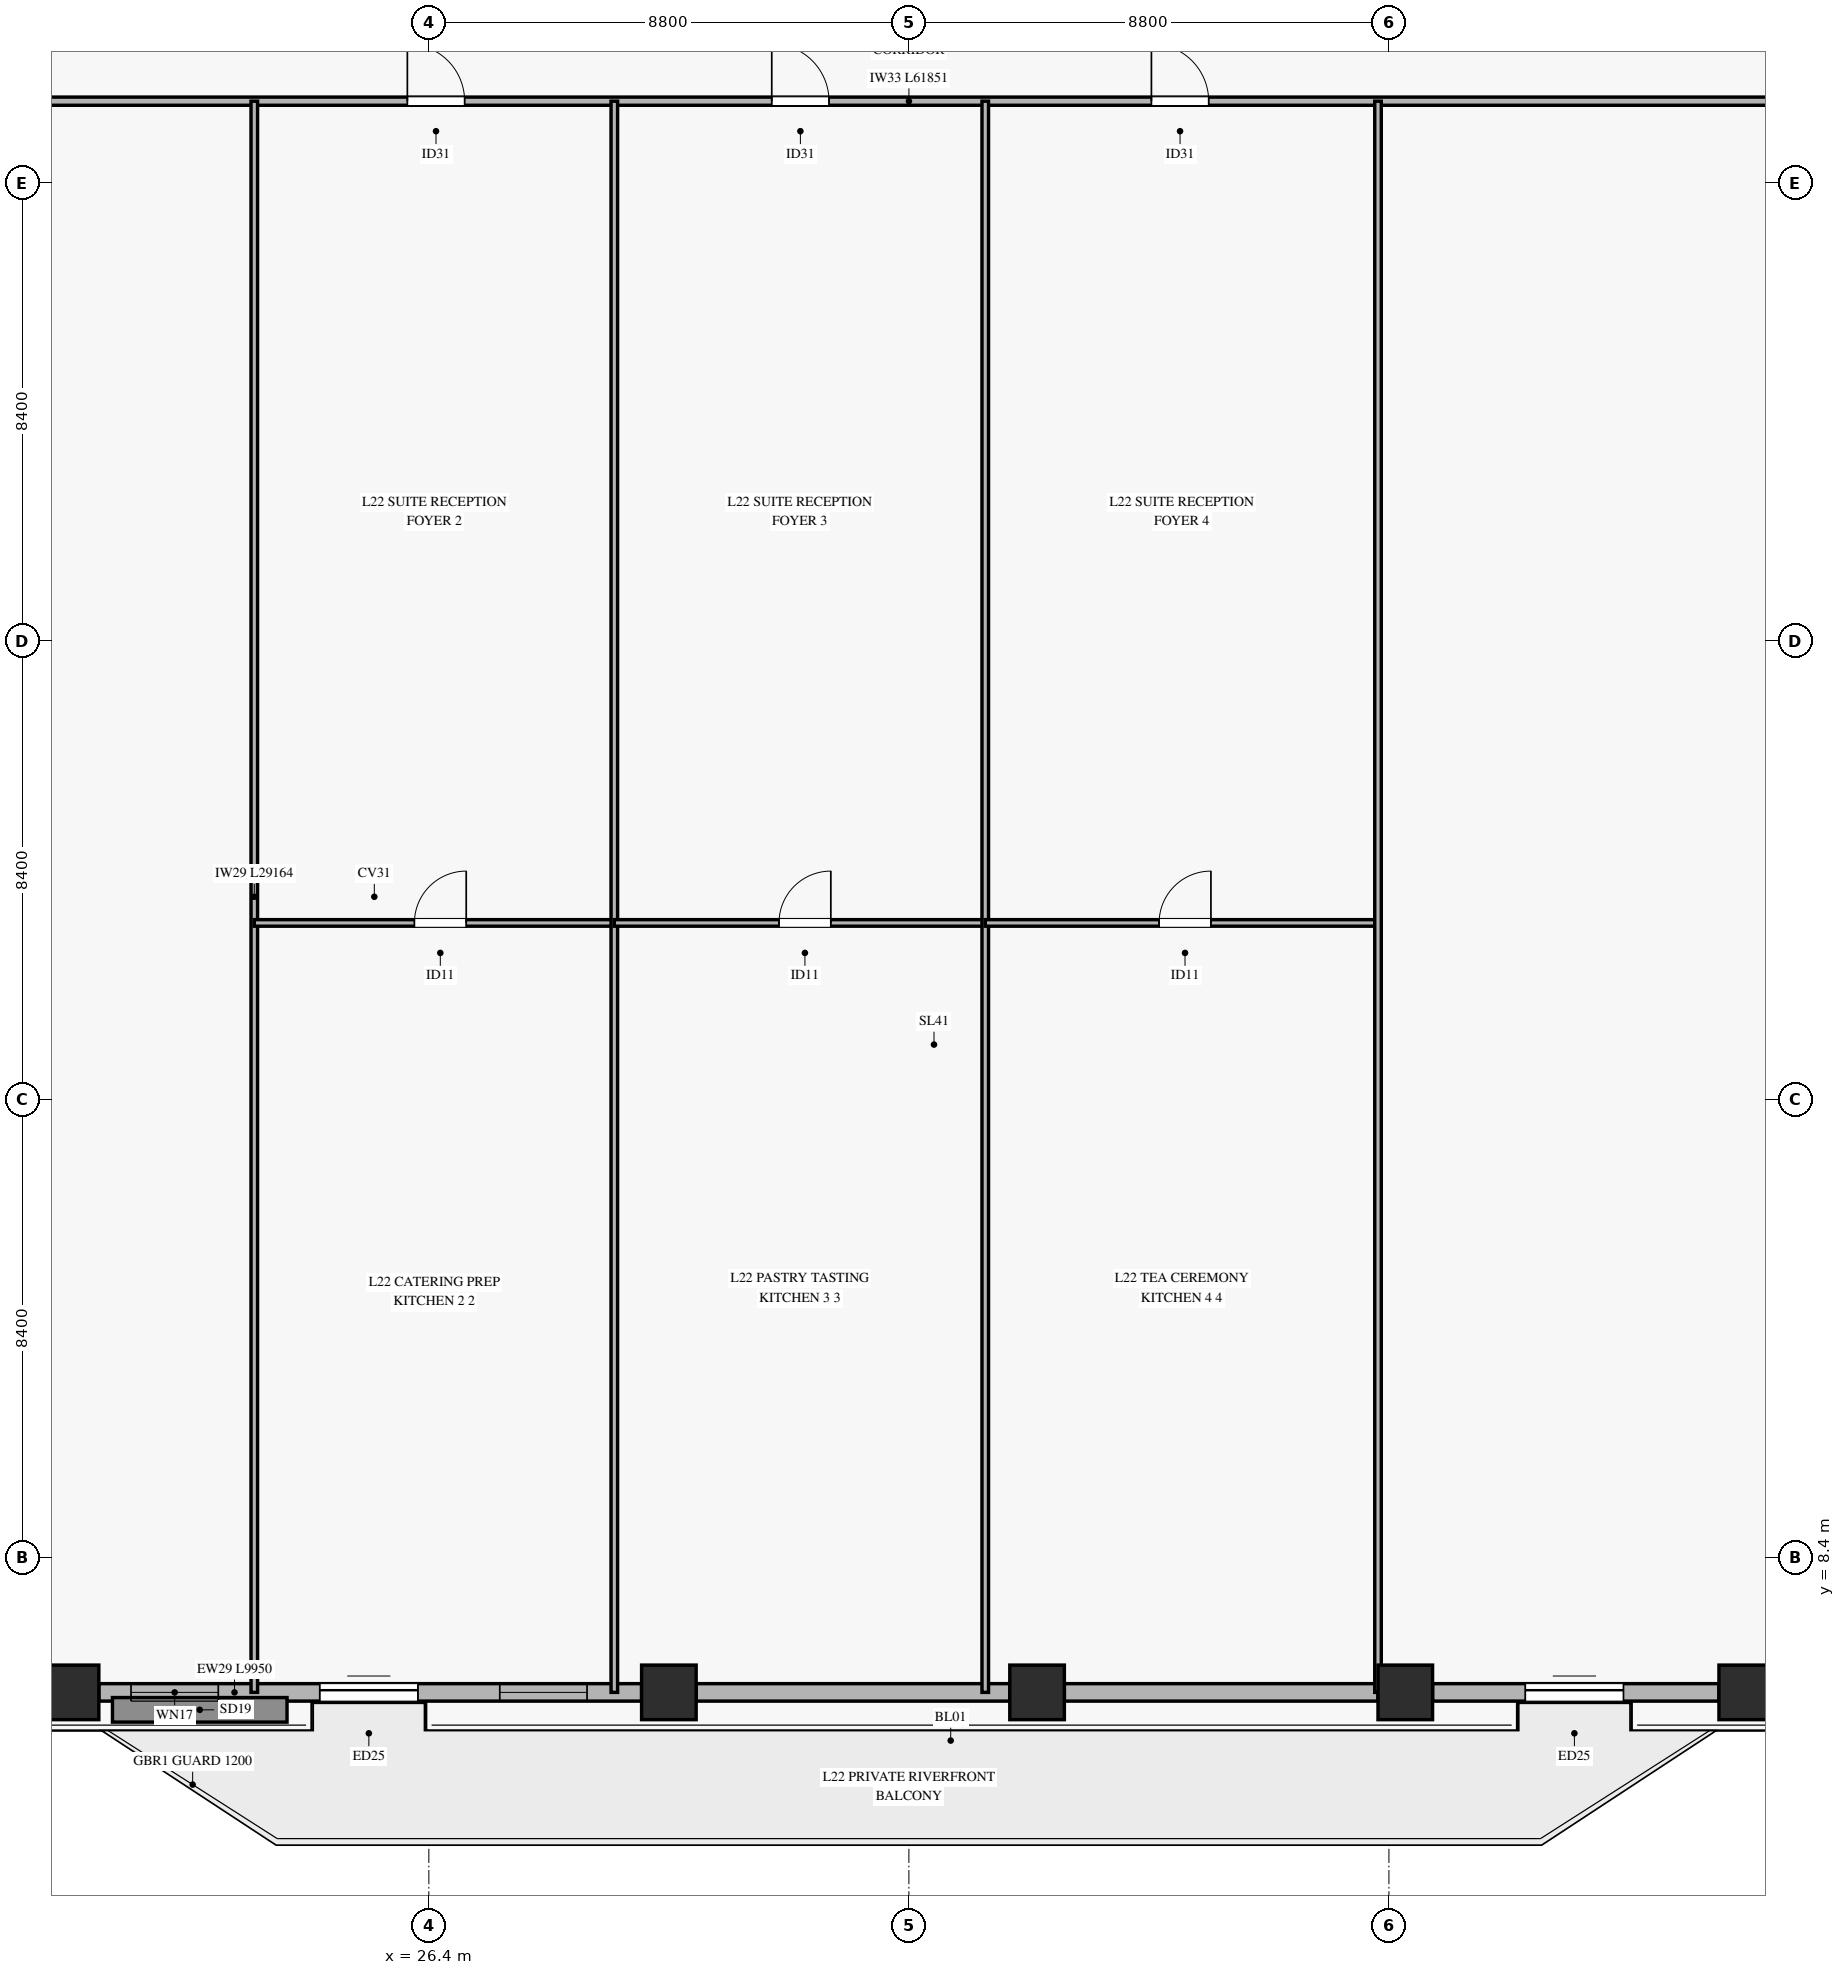
"""IFC4 building model, lengths in metres.
Left out: names, types, materials, properties, quantities, classifications, styles, units other than length and angle.
Written with IfcOpenShell. Run it as: python <this file> out.ifc"""

import sys

from ifc_helpers import new_model, si_unit, direction, frame, frame_2d, origin, origin_2d, place, context, subcontext, project, spatial, rectangle, hollow_rectangle, extrude, source, transform, mapped, element, fill, save


model = new_model("IFC4")
c1 = context("Model", 3, precision=1e-05, world=origin(), true_north=direction((0.0, 1.0)))
c2 = subcontext(c1, "Body", "Model", "MODEL_VIEW")
j1 = project(units=[si_unit("LENGTHUNIT", "METRE"), si_unit("PLANEANGLEUNIT", "RADIAN")], contexts=[c1])
p1 = place(None, origin())
s1 = spatial("IfcSite", under=j1, at=p1, CompositionType="ELEMENT")
p2 = place(p1, origin())
s2 = spatial("IfcBuilding", under=s1, at=p2, CompositionType="ELEMENT")
p3 = place(p2, frame((0.0, 0.0, 91.3)))
s3 = spatial("IfcBuildingStorey", under=s2, at=p3, CompositionType="ELEMENT", Elevation=91.3)
m1 = source(origin(), c2, "Body", "SweptSolid", [
    extrude(hollow_rectangle(XDim=1.0, YDim=1.0, WallThickness=0.045, at=origin_2d()), origin(), (0.0, 0.0, 1.0), 3.62),
])
for number, where, z_axis, x_axis in (
    (1, (19.85, 5.936, 0.0), (0.0, 0.0, 1.0), (1.0, 0.0, 0.0)),
    (2, (30.8, 5.936, 0.0), (0.0, 0.0, 1.0), (1.0, 0.0, 0.0)),
    (3, (37.55, 5.936, 0.0), (0.0, 0.0, 1.0), (1.0, 0.0, 0.0)),
    (4, (44.3, 5.936, 0.0), (0.0, 0.0, 1.0), (1.0, 0.0, 0.0)),
    (5, (50.55, 5.936, 0.0), (0.0, 0.0, 1.0), (1.0, 0.0, 0.0)),
):
    element("IfcColumn", number, at=place(p3, frame(where, z_axis=z_axis, x_axis=x_axis)), inside=s3, PredefinedType="COLUMN", context=c2, shape_type="MappedRepresentation", body=[
        mapped(m1, transform((0.0, 0.0, 0.0), x_axis=(1.0, 0.0, 0.0), y_axis=(0.0, 1.0, 0.0), z_axis=(0.0, 0.0, 1.0), scale=1.0)),
    ])
p4 = place(p3, frame((20.35, 5.936, 0.0), z_axis=(0.0, 0.0, 1.0), x_axis=(1.0, 0.0, 0.0)))
e6 = element("IfcWall", 6, at=p4, inside=s3, PredefinedType="SOLIDWALL", context=c2, shape_type="SweptSolid", body=[
    extrude(rectangle(XDim=9.95, YDim=0.32, at=frame_2d((4.975, 0.0))), origin(), (0.0, 0.0, 1.0), 3.1),
])
p5 = place(p4, frame((4.05, 0.0, 0.0)))
e7 = element("IfcOpeningElement", 7, at=p5, cuts=e6, PredefinedType="OPENING", context=c2, shape_type="SweptSolid", body=[
    extrude(rectangle(XDim=1.8, YDim=2.25, at=frame_2d((0.9, 1.125))), frame((0.0, 0.17, 0.0), z_axis=(0.0, -1.0, 0.0), x_axis=(1.0, 0.0, 0.0)), (0.0, 0.0, 1.0), 0.34),
])
p6 = place(p4, frame((0.59, 0.0, 0.45)))
e8 = element("IfcOpeningElement", 8, at=p6, cuts=e6, PredefinedType="OPENING", context=c2, shape_type="SweptSolid", body=[
    extrude(rectangle(XDim=1.6, YDim=2.0, at=frame_2d((0.8, 1.0))), frame((0.0, 0.17, 0.0), z_axis=(0.0, -1.0, 0.0), x_axis=(1.0, 0.0, 0.0)), (0.0, 0.0, 1.0), 0.34),
])
p7 = place(p4, frame((7.35, 0.0, 0.45)))
e9 = element("IfcOpeningElement", 9, at=p7, cuts=e6, PredefinedType="OPENING", context=c2, shape_type="SweptSolid", body=[
    extrude(rectangle(XDim=1.6, YDim=2.0, at=frame_2d((0.8, 1.0))), frame((0.0, 0.17, 0.0), z_axis=(0.0, -1.0, 0.0), x_axis=(1.0, 0.0, 0.0)), (0.0, 0.0, 1.0), 0.34),
])
for number, where, z_axis, x_axis in (
    (10, (31.3, 5.936, 0.0), (0.0, 0.0, 1.0), (1.0, 0.0, 0.0)),
    (11, (38.05, 5.936, 0.0), (0.0, 0.0, 1.0), (1.0, 0.0, 0.0)),
):
    element("IfcWall", number, at=place(p3, frame(where, z_axis=z_axis, x_axis=x_axis)), inside=s3, PredefinedType="SOLIDWALL", context=c2, shape_type="SweptSolid", body=[
        extrude(rectangle(XDim=5.75, YDim=0.32, at=frame_2d((2.875, 0.0))), origin(), (0.0, 0.0, 1.0), 3.1),
    ])
p8 = place(p3, frame((44.8, 5.936, 0.0), z_axis=(0.0, 0.0, 1.0), x_axis=(1.0, 0.0, 0.0)))
e12 = element("IfcWall", 12, at=p8, inside=s3, PredefinedType="SOLIDWALL", context=c2, shape_type="SweptSolid", body=[
    extrude(rectangle(XDim=5.25, YDim=0.32, at=frame_2d((2.625, 0.0))), origin(), (0.0, 0.0, 1.0), 3.1),
])
p9 = place(p8, frame((1.7, 0.0, 0.0)))
e13 = element("IfcOpeningElement", 13, at=p9, cuts=e12, PredefinedType="OPENING", context=c2, shape_type="SweptSolid", body=[
    extrude(rectangle(XDim=1.8, YDim=2.25, at=frame_2d((0.9, 1.125))), frame((0.0, 0.17, 0.0), z_axis=(0.0, -1.0, 0.0), x_axis=(1.0, 0.0, 0.0)), (0.0, 0.0, 1.0), 0.34),
])
p10 = place(p3, frame((4.275, 35.1, 0.0), z_axis=(0.0, 0.0, 1.0), x_axis=(1.0, 0.0, 0.0)))
e14 = element("IfcWall", 14, at=p10, inside=s3, PredefinedType="PARTITIONING", context=c2, shape_type="SweptSolid", body=[
    extrude(rectangle(XDim=61.851, YDim=0.15, at=frame_2d((30.926, 0.0))), origin(), (0.0, 0.0, 1.0), 2.705),
])
p11 = place(p10, frame((8.227, 0.0, 0.0)))
e15 = element("IfcOpeningElement", 15, at=p11, cuts=e14, PredefinedType="OPENING", context=c2, shape_type="SweptSolid", body=[
    extrude(rectangle(XDim=1.05, YDim=2.15, at=frame_2d((0.525, 1.075))), frame((0.0, 0.085, 0.0), z_axis=(0.0, -1.0, 0.0), x_axis=(1.0, 0.0, 0.0)), (0.0, 0.0, 1.0), 0.17),
])
p12 = place(p10, frame((21.731, 0.0, 0.0)))
e16 = element("IfcOpeningElement", 16, at=p12, cuts=e14, PredefinedType="OPENING", context=c2, shape_type="SweptSolid", body=[
    extrude(rectangle(XDim=1.05, YDim=2.15, at=frame_2d((0.525, 1.075))), frame((0.0, 0.085, 0.0), z_axis=(0.0, -1.0, 0.0), x_axis=(1.0, 0.0, 0.0)), (0.0, 0.0, 1.0), 0.17),
])
p13 = place(p10, frame((28.411, 0.0, 0.0)))
e17 = element("IfcOpeningElement", 17, at=p13, cuts=e14, PredefinedType="OPENING", context=c2, shape_type="SweptSolid", body=[
    extrude(rectangle(XDim=1.05, YDim=2.15, at=frame_2d((0.525, 1.075))), frame((0.0, 0.085, 0.0), z_axis=(0.0, -1.0, 0.0), x_axis=(1.0, 0.0, 0.0)), (0.0, 0.0, 1.0), 0.17),
])
p14 = place(p10, frame((35.371, 0.0, 0.0)))
e18 = element("IfcOpeningElement", 18, at=p14, cuts=e14, PredefinedType="OPENING", context=c2, shape_type="SweptSolid", body=[
    extrude(rectangle(XDim=1.05, YDim=2.15, at=frame_2d((0.525, 1.075))), frame((0.0, 0.085, 0.0), z_axis=(0.0, -1.0, 0.0), x_axis=(1.0, 0.0, 0.0)), (0.0, 0.0, 1.0), 0.17),
])
p15 = place(p10, frame((48.981, 0.0, 0.0)))
e19 = element("IfcOpeningElement", 19, at=p15, cuts=e14, PredefinedType="OPENING", context=c2, shape_type="SweptSolid", body=[
    extrude(rectangle(XDim=1.05, YDim=2.15, at=frame_2d((0.525, 1.075))), frame((0.0, 0.085, 0.0), z_axis=(0.0, -1.0, 0.0), x_axis=(1.0, 0.0, 0.0)), (0.0, 0.0, 1.0), 0.17),
])
p16 = place(p3, frame((23.2, 5.936, 0.0), z_axis=(0.0, 0.0, 1.0), x_axis=(0.0, 1.0, 0.0)))
e20 = element("IfcWall", 20, at=p16, inside=s3, PredefinedType="PARTITIONING", context=c2, shape_type="SweptSolid", body=[
    extrude(rectangle(XDim=29.164, YDim=0.12, at=frame_2d((14.582, 0.0))), origin(), (0.0, 0.0, 1.0), 3.105),
])
p17 = place(p3, frame((23.2, 20.039, 0.0), z_axis=(0.0, 0.0, 1.0), x_axis=(1.0, 0.0, 0.0)))
e21 = element("IfcWall", 21, at=p17, inside=s3, PredefinedType="PARTITIONING", context=c2, shape_type="SweptSolid", body=[
    extrude(rectangle(XDim=6.6, YDim=0.12, at=frame_2d((3.3, 0.0))), origin(), (0.0, 0.0, 1.0), 3.62),
])
p18 = place(p17, frame((2.935, 0.0, 0.0)))
e22 = element("IfcOpeningElement", 22, at=p18, cuts=e21, PredefinedType="OPENING", context=c2, shape_type="SweptSolid", body=[
    extrude(rectangle(XDim=0.95, YDim=2.1, at=frame_2d((0.475, 1.05))), frame((0.0, 0.07, 0.0), z_axis=(0.0, -1.0, 0.0), x_axis=(1.0, 0.0, 0.0)), (0.0, 0.0, 1.0), 0.14),
])
p19 = place(p3, frame((29.8, 5.936, 0.0), z_axis=(0.0, 0.0, 1.0), x_axis=(0.0, 1.0, 0.0)))
e23 = element("IfcWall", 23, at=p19, inside=s3, PredefinedType="PARTITIONING", context=c2, shape_type="SweptSolid", body=[
    extrude(rectangle(XDim=29.164, YDim=0.12, at=frame_2d((14.582, 0.0))), origin(), (0.0, 0.0, 1.0), 3.105),
])
p20 = place(p3, frame((29.8, 20.039, 0.0), z_axis=(0.0, 0.0, 1.0), x_axis=(1.0, 0.0, 0.0)))
e24 = element("IfcWall", 24, at=p20, inside=s3, PredefinedType="PARTITIONING", context=c2, shape_type="SweptSolid", body=[
    extrude(rectangle(XDim=6.8, YDim=0.12, at=frame_2d((3.4, 0.0))), origin(), (0.0, 0.0, 1.0), 2.705),
])
p21 = place(p20, frame((3.019, 0.0, 0.0)))
e25 = element("IfcOpeningElement", 25, at=p21, cuts=e24, PredefinedType="OPENING", context=c2, shape_type="SweptSolid", body=[
    extrude(rectangle(XDim=0.95, YDim=2.1, at=frame_2d((0.475, 1.05))), frame((0.0, 0.07, 0.0), z_axis=(0.0, -1.0, 0.0), x_axis=(1.0, 0.0, 0.0)), (0.0, 0.0, 1.0), 0.14),
])
p22 = place(p3, frame((36.6, 5.936, 0.0), z_axis=(0.0, 0.0, 1.0), x_axis=(0.0, 1.0, 0.0)))
e26 = element("IfcWall", 26, at=p22, inside=s3, PredefinedType="PARTITIONING", context=c2, shape_type="SweptSolid", body=[
    extrude(rectangle(XDim=29.164, YDim=0.12, at=frame_2d((14.582, 0.0))), origin(), (0.0, 0.0, 1.0), 3.105),
])
p23 = place(p3, frame((36.6, 20.039, 0.0), z_axis=(0.0, 0.0, 1.0), x_axis=(1.0, 0.0, 0.0)))
e27 = element("IfcWall", 27, at=p23, inside=s3, PredefinedType="PARTITIONING", context=c2, shape_type="SweptSolid", body=[
    extrude(rectangle(XDim=7.2, YDim=0.12, at=frame_2d((3.6, 0.0))), origin(), (0.0, 0.0, 1.0), 2.705),
])
p24 = place(p23, frame((3.187, 0.0, 0.0)))
e28 = element("IfcOpeningElement", 28, at=p24, cuts=e27, PredefinedType="OPENING", context=c2, shape_type="SweptSolid", body=[
    extrude(rectangle(XDim=0.95, YDim=2.1, at=frame_2d((0.475, 1.05))), frame((0.0, 0.07, 0.0), z_axis=(0.0, -1.0, 0.0), x_axis=(1.0, 0.0, 0.0)), (0.0, 0.0, 1.0), 0.14),
])
p25 = place(p3, frame((43.8, 5.936, 0.0), z_axis=(0.0, 0.0, 1.0), x_axis=(0.0, 1.0, 0.0)))
e29 = element("IfcWall", 29, at=p25, inside=s3, PredefinedType="PARTITIONING", context=c2, shape_type="SweptSolid", body=[
    extrude(rectangle(XDim=29.164, YDim=0.12, at=frame_2d((14.582, 0.0))), origin(), (0.0, 0.0, 1.0), 3.155),
])
m2 = source(origin(), c2, "Body", "SweptSolid", [
    extrude(rectangle(XDim=1.8, YDim=2.25, at=frame_2d((0.9, 1.125))), frame((0.0, 0.025, 0.0), z_axis=(0.0, -1.0, 0.0), x_axis=(1.0, 0.0, 0.0)), (0.0, 0.0, 1.0), 0.05),
])
p26 = place(p5, origin())
e30 = element("IfcDoor", 30, at=p26, inside=s3, OperationType="SLIDING_TO_LEFT", PredefinedType="DOOR", context=c2, shape_type="MappedRepresentation", body=[
    mapped(m2, transform((0.0, 0.0, 0.0), x_axis=(1.0, 0.0, 0.0), y_axis=(0.0, 1.0, 0.0), z_axis=(0.0, 0.0, 1.0), scale=1.0)),
])
fill(e7, e30)
m3 = source(origin(), c2, "Body", "SweptSolid", [
    extrude(rectangle(XDim=1.6, YDim=2.0, at=frame_2d((0.8, 1.0))), frame((0.0, 0.03, 0.0), z_axis=(0.0, -1.0, 0.0), x_axis=(1.0, 0.0, 0.0)), (0.0, 0.0, 1.0), 0.06),
])
p27 = place(p6, origin())
e31 = element("IfcWindow", 31, at=p27, inside=s3, PartitioningType="SINGLE_PANEL", PredefinedType="WINDOW", context=c2, shape_type="MappedRepresentation", body=[
    mapped(m3, transform((0.0, 0.0, 0.0), x_axis=(1.0, 0.0, 0.0), y_axis=(0.0, 1.0, 0.0), z_axis=(0.0, 0.0, 1.0), scale=1.0)),
])
fill(e8, e31)
p28 = place(p7, origin())
e32 = element("IfcWindow", 32, at=p28, inside=s3, PartitioningType="SINGLE_PANEL", PredefinedType="WINDOW", context=c2, shape_type="MappedRepresentation", body=[
    mapped(m3, transform((0.0, 0.0, 0.0), x_axis=(1.0, 0.0, 0.0), y_axis=(0.0, 1.0, 0.0), z_axis=(0.0, 0.0, 1.0), scale=1.0)),
])
fill(e9, e32)
p29 = place(p9, origin())
e33 = element("IfcDoor", 33, at=p29, inside=s3, OperationType="SLIDING_TO_LEFT", PredefinedType="DOOR", context=c2, shape_type="MappedRepresentation", body=[
    mapped(m2, transform((0.0, 0.0, 0.0), x_axis=(1.0, 0.0, 0.0), y_axis=(0.0, 1.0, 0.0), z_axis=(0.0, 0.0, 1.0), scale=1.0)),
])
fill(e13, e33)
m4 = source(origin(), c2, "Body", "SweptSolid", [
    extrude(rectangle(XDim=1.05, YDim=2.15, at=frame_2d((0.525, 1.075))), frame((0.0, 0.025, 0.0), z_axis=(0.0, -1.0, 0.0), x_axis=(1.0, 0.0, 0.0)), (0.0, 0.0, 1.0), 0.05),
])
p30 = place(p12, origin())
e34 = element("IfcDoor", 34, at=p30, inside=s3, OperationType="SINGLE_SWING_LEFT", PredefinedType="DOOR", context=c2, shape_type="MappedRepresentation", body=[
    mapped(m4, transform((0.0, 0.0, 0.0), x_axis=(1.0, 0.0, 0.0), y_axis=(0.0, 1.0, 0.0), z_axis=(0.0, 0.0, 1.0), scale=1.0)),
])
fill(e16, e34)
m5 = source(origin(), c2, "Body", "SweptSolid", [
    extrude(rectangle(XDim=0.95, YDim=2.1, at=frame_2d((0.475, 1.05))), frame((0.0, 0.025, 0.0), z_axis=(0.0, -1.0, 0.0), x_axis=(1.0, 0.0, 0.0)), (0.0, 0.0, 1.0), 0.05),
])
p31 = place(p18, origin())
e35 = element("IfcDoor", 35, at=p31, inside=s3, OperationType="SINGLE_SWING_RIGHT", PredefinedType="DOOR", context=c2, shape_type="MappedRepresentation", body=[
    mapped(m5, transform((0.0, 0.0, 0.0), x_axis=(1.0, 0.0, 0.0), y_axis=(0.0, 1.0, 0.0), z_axis=(0.0, 0.0, 1.0), scale=1.0)),
])
fill(e22, e35)
p32 = place(p13, origin())
e36 = element("IfcDoor", 36, at=p32, inside=s3, OperationType="SINGLE_SWING_LEFT", PredefinedType="DOOR", context=c2, shape_type="MappedRepresentation", body=[
    mapped(m4, transform((0.0, 0.0, 0.0), x_axis=(1.0, 0.0, 0.0), y_axis=(0.0, 1.0, 0.0), z_axis=(0.0, 0.0, 1.0), scale=1.0)),
])
fill(e17, e36)
p33 = place(p21, origin())
e37 = element("IfcDoor", 37, at=p33, inside=s3, OperationType="SINGLE_SWING_RIGHT", PredefinedType="DOOR", context=c2, shape_type="MappedRepresentation", body=[
    mapped(m5, transform((0.0, 0.0, 0.0), x_axis=(1.0, 0.0, 0.0), y_axis=(0.0, 1.0, 0.0), z_axis=(0.0, 0.0, 1.0), scale=1.0)),
])
fill(e25, e37)
p34 = place(p14, origin())
e38 = element("IfcDoor", 38, at=p34, inside=s3, OperationType="SINGLE_SWING_LEFT", PredefinedType="DOOR", context=c2, shape_type="MappedRepresentation", body=[
    mapped(m4, transform((0.0, 0.0, 0.0), x_axis=(1.0, 0.0, 0.0), y_axis=(0.0, 1.0, 0.0), z_axis=(0.0, 0.0, 1.0), scale=1.0)),
])
fill(e18, e38)
p35 = place(p24, origin())
e39 = element("IfcDoor", 39, at=p35, inside=s3, OperationType="SINGLE_SWING_RIGHT", PredefinedType="DOOR", context=c2, shape_type="MappedRepresentation", body=[
    mapped(m5, transform((0.0, 0.0, 0.0), x_axis=(1.0, 0.0, 0.0), y_axis=(0.0, 1.0, 0.0), z_axis=(0.0, 0.0, 1.0), scale=1.0)),
])
fill(e28, e39)
save(model, sys.argv[1])
